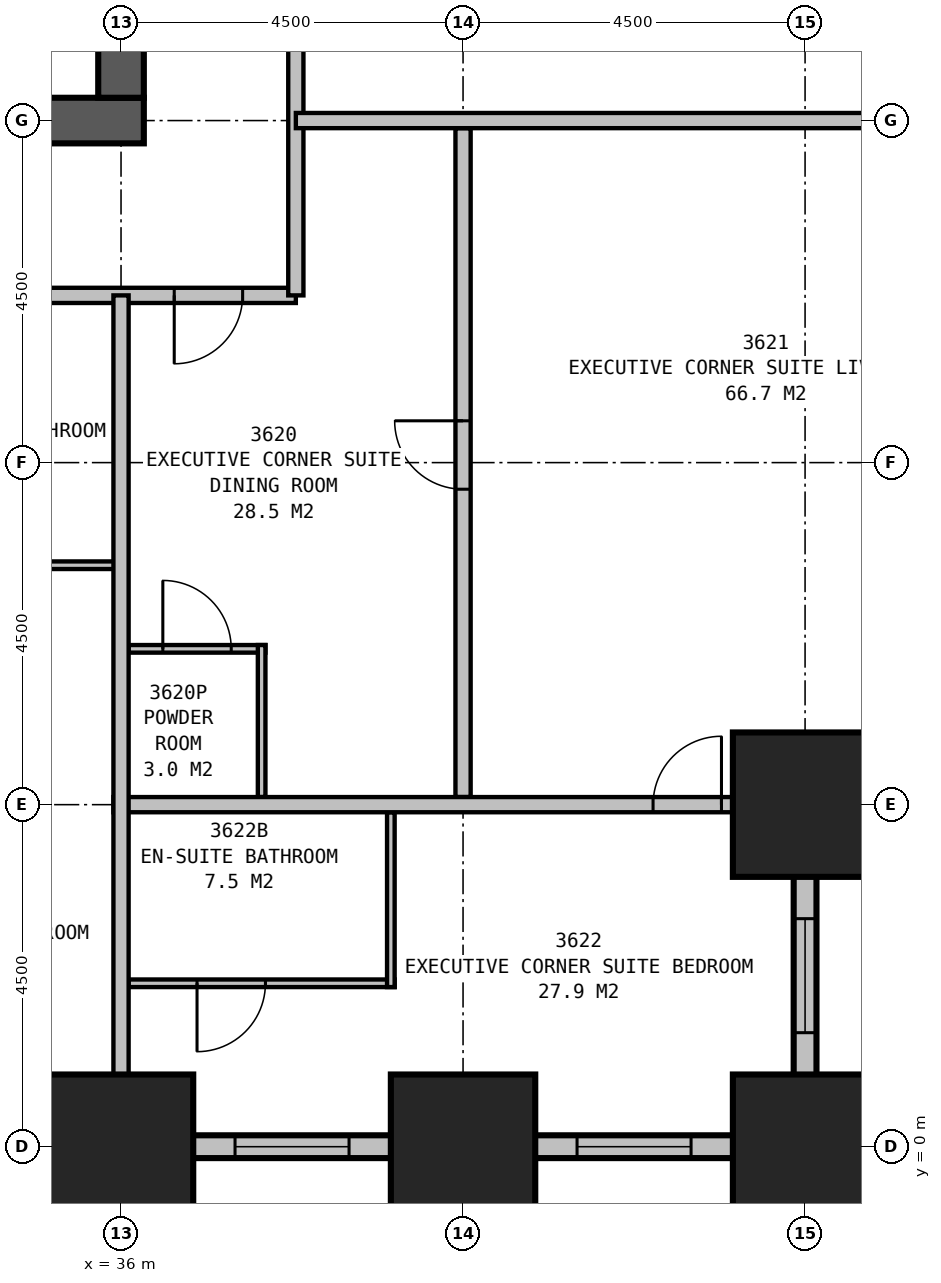
"""IFC4 building model, lengths in metres.
Left out: names, types, materials, properties, quantities, classifications, styles, units other than length and angle.
Written with IfcOpenShell. Run it as: python <this file> out.ifc"""

import sys

from ifc_helpers import new_model, si_unit, direction, frame, frame_2d, origin, origin_2d, place, context, subcontext, project, spatial, rectangle, extrude, element, fill, save


model = new_model("IFC4")
c1 = context("Model", 3, precision=1e-05, world=origin(), true_north=direction((0.0, 1.0)))
c2 = subcontext(c1, "Body", "Model", "MODEL_VIEW")
j1 = project(units=[si_unit("LENGTHUNIT", "METRE"), si_unit("PLANEANGLEUNIT", "RADIAN")], contexts=[c1])
p1 = place(None, origin())
s1 = spatial("IfcSite", under=j1, at=p1, CompositionType="ELEMENT")
p2 = place(p1, origin())
s2 = spatial("IfcBuilding", under=s1, at=p2, CompositionType="ELEMENT")
p3 = place(p2, frame((0.0, 0.0, 138.9)))
s3 = spatial("IfcBuildingStorey", under=s2, at=p3, CompositionType="ELEMENT", Elevation=138.9)
for number, where, z_axis, x_axis in (
    (1, (36.0, 0.0, 0.0), (0.0, 0.0, 1.0), (1.0, 0.0, 0.0)),
    (2, (40.5, 0.0, 0.0), (0.0, 0.0, 1.0), (1.0, 0.0, 0.0)),
    (3, (45.0, 0.0, 0.0), (0.0, 0.0, 1.0), (1.0, 0.0, 0.0)),
    (4, (45.0, 4.5, 0.0), (0.0, 0.0, 1.0), (1.0, 0.0, 0.0)),
):
    element("IfcColumn", number, at=place(p3, frame(where, z_axis=z_axis, x_axis=x_axis)), inside=s3, PredefinedType="COLUMN", context=c2, shape_type="SweptSolid", body=[
        extrude(rectangle(XDim=1.9, YDim=1.9, at=origin_2d()), origin(), (0.0, 0.0, 1.0), 3.5),
    ])
p4 = place(p3, frame((13.2, 13.5, 0.0), z_axis=(0.0, 0.0, 1.0), x_axis=(1.0, 0.0, 0.0)))
e5 = element("IfcWall", 5, at=p4, inside=s3, PredefinedType="SHEAR", context=c2, shape_type="SweptSolid", body=[
    extrude(rectangle(XDim=23.1, YDim=0.6, at=frame_2d((11.55, 0.0))), origin(), (0.0, 0.0, 1.0), 3.5),
])
p5 = place(p3, frame((36.0, 13.8, 0.0), z_axis=(0.0, 0.0, 1.0), x_axis=(0.0, 1.0, 0.0)))
e6 = element("IfcWall", 6, at=p5, inside=s3, PredefinedType="SHEAR", context=c2, shape_type="SweptSolid", body=[
    extrude(rectangle(XDim=2.7, YDim=0.6, at=frame_2d((1.35, 0.0))), origin(), (0.0, 0.0, 1.0), 3.5),
])
p6 = place(p3, frame((4.35, 0.0, 0.0), z_axis=(0.0, 0.0, 1.0), x_axis=(1.0, 0.0, 0.0)))
e7 = element("IfcWall", 7, at=p6, inside=s3, PredefinedType="STANDARD", context=c2, shape_type="SweptSolid", body=[
    extrude(rectangle(XDim=40.8, YDim=0.3, at=frame_2d((20.4, 0.0))), origin(), (0.0, 0.0, 1.0), 2.15),
])
p7 = place(p6, frame((1.65, 0.0, 0.5)))
e8 = element("IfcOpeningElement", 8, at=p7, cuts=e7, PredefinedType="OPENING", context=c2, shape_type="SweptSolid", body=[
    extrude(rectangle(XDim=1.5, YDim=1.5, at=frame_2d((0.75, 0.75))), frame((0.0, 0.16, 0.0), z_axis=(0.0, -1.0, 0.0), x_axis=(1.0, 0.0, 0.0)), (0.0, 0.0, 1.0), 0.32),
])
p8 = place(p6, frame((6.15, 0.0, 0.5)))
e9 = element("IfcOpeningElement", 9, at=p8, cuts=e7, PredefinedType="OPENING", context=c2, shape_type="SweptSolid", body=[
    extrude(rectangle(XDim=1.5, YDim=1.5, at=frame_2d((0.75, 0.75))), frame((0.0, 0.16, 0.0), z_axis=(0.0, -1.0, 0.0), x_axis=(1.0, 0.0, 0.0)), (0.0, 0.0, 1.0), 0.32),
])
p9 = place(p6, frame((10.65, 0.0, 0.5)))
e10 = element("IfcOpeningElement", 10, at=p9, cuts=e7, PredefinedType="OPENING", context=c2, shape_type="SweptSolid", body=[
    extrude(rectangle(XDim=1.5, YDim=1.5, at=frame_2d((0.75, 0.75))), frame((0.0, 0.16, 0.0), z_axis=(0.0, -1.0, 0.0), x_axis=(1.0, 0.0, 0.0)), (0.0, 0.0, 1.0), 0.32),
])
p10 = place(p6, frame((15.15, 0.0, 0.5)))
e11 = element("IfcOpeningElement", 11, at=p10, cuts=e7, PredefinedType="OPENING", context=c2, shape_type="SweptSolid", body=[
    extrude(rectangle(XDim=1.5, YDim=1.5, at=frame_2d((0.75, 0.75))), frame((0.0, 0.16, 0.0), z_axis=(0.0, -1.0, 0.0), x_axis=(1.0, 0.0, 0.0)), (0.0, 0.0, 1.0), 0.32),
])
p11 = place(p6, frame((19.65, 0.0, 0.5)))
e12 = element("IfcOpeningElement", 12, at=p11, cuts=e7, PredefinedType="OPENING", context=c2, shape_type="SweptSolid", body=[
    extrude(rectangle(XDim=1.5, YDim=1.5, at=frame_2d((0.75, 0.75))), frame((0.0, 0.16, 0.0), z_axis=(0.0, -1.0, 0.0), x_axis=(1.0, 0.0, 0.0)), (0.0, 0.0, 1.0), 0.32),
])
p12 = place(p6, frame((24.15, 0.0, 0.5)))
e13 = element("IfcOpeningElement", 13, at=p12, cuts=e7, PredefinedType="OPENING", context=c2, shape_type="SweptSolid", body=[
    extrude(rectangle(XDim=1.5, YDim=1.5, at=frame_2d((0.75, 0.75))), frame((0.0, 0.16, 0.0), z_axis=(0.0, -1.0, 0.0), x_axis=(1.0, 0.0, 0.0)), (0.0, 0.0, 1.0), 0.32),
])
p13 = place(p6, frame((28.65, 0.0, 0.5)))
e14 = element("IfcOpeningElement", 14, at=p13, cuts=e7, PredefinedType="OPENING", context=c2, shape_type="SweptSolid", body=[
    extrude(rectangle(XDim=1.5, YDim=1.5, at=frame_2d((0.75, 0.75))), frame((0.0, 0.16, 0.0), z_axis=(0.0, -1.0, 0.0), x_axis=(1.0, 0.0, 0.0)), (0.0, 0.0, 1.0), 0.32),
])
p14 = place(p6, frame((33.15, 0.0, 0.5)))
e15 = element("IfcOpeningElement", 15, at=p14, cuts=e7, PredefinedType="OPENING", context=c2, shape_type="SweptSolid", body=[
    extrude(rectangle(XDim=1.5, YDim=1.5, at=frame_2d((0.75, 0.75))), frame((0.0, 0.16, 0.0), z_axis=(0.0, -1.0, 0.0), x_axis=(1.0, 0.0, 0.0)), (0.0, 0.0, 1.0), 0.32),
])
p15 = place(p6, frame((37.65, 0.0, 0.5)))
e16 = element("IfcOpeningElement", 16, at=p15, cuts=e7, PredefinedType="OPENING", context=c2, shape_type="SweptSolid", body=[
    extrude(rectangle(XDim=1.5, YDim=1.5, at=frame_2d((0.75, 0.75))), frame((0.0, 0.16, 0.0), z_axis=(0.0, -1.0, 0.0), x_axis=(1.0, 0.0, 0.0)), (0.0, 0.0, 1.0), 0.32),
])
p16 = place(p3, frame((45.0, -0.15, 0.0), z_axis=(0.0, 0.0, 1.0), x_axis=(0.0, 1.0, 0.0)))
e17 = element("IfcWall", 17, at=p16, inside=s3, PredefinedType="STANDARD", context=c2, shape_type="SweptSolid", body=[
    extrude(rectangle(XDim=4.8, YDim=0.3, at=frame_2d((2.4, 0.0))), origin(), (0.0, 0.0, 1.0), 2.15),
])
p17 = place(p16, frame((1.65, 0.0, 0.5)))
e18 = element("IfcOpeningElement", 18, at=p17, cuts=e17, PredefinedType="OPENING", context=c2, shape_type="SweptSolid", body=[
    extrude(rectangle(XDim=1.5, YDim=1.5, at=frame_2d((0.75, 0.75))), frame((0.0, 0.16, 0.0), z_axis=(0.0, -1.0, 0.0), x_axis=(1.0, 0.0, 0.0)), (0.0, 0.0, 1.0), 0.32),
])
p18 = place(p3, frame((44.85, 4.5, 0.0), z_axis=(0.0, 0.0, 1.0), x_axis=(1.0, 0.0, 0.0)))
e19 = element("IfcWall", 19, at=p18, inside=s3, PredefinedType="STANDARD", context=c2, shape_type="SweptSolid", body=[
    extrude(rectangle(XDim=4.3, YDim=0.3, at=frame_2d((2.15, 0.0))), origin(), (0.0, 0.0, 1.0), 2.15),
])
p19 = place(p18, frame((1.4, 0.0, 0.5)))
e20 = element("IfcOpeningElement", 20, at=p19, cuts=e19, PredefinedType="OPENING", context=c2, shape_type="SweptSolid", body=[
    extrude(rectangle(XDim=1.5, YDim=1.5, at=frame_2d((0.75, 0.75))), frame((0.0, 0.16, 0.0), z_axis=(0.0, -1.0, 0.0), x_axis=(1.0, 0.0, 0.0)), (0.0, 0.0, 1.0), 0.32),
])
p20 = place(p3, frame((49.017, 4.351, 0.0), z_axis=(0.0, 0.0, 1.0), x_axis=(-0.110433201132, 0.993883548555, 0.0)))
e21 = element("IfcWall", 21, at=p20, inside=s3, PredefinedType="STANDARD", context=c2, shape_type="SweptSolid", body=[
    extrude(rectangle(XDim=31.994, YDim=0.3, at=frame_2d((15.997, 0.0))), origin(), (0.0, 0.0, 1.0), 2.15),
])
p21 = place(p20, frame((1.664, 0.0, 0.5)))
e22 = element("IfcOpeningElement", 22, at=p21, cuts=e21, PredefinedType="OPENING", context=c2, shape_type="SweptSolid", body=[
    extrude(rectangle(XDim=1.5, YDim=1.5, at=frame_2d((0.75, 0.75))), frame((0.0, 0.16, 0.0), z_axis=(0.0, -1.0, 0.0), x_axis=(1.0, 0.0, 0.0)), (0.0, 0.0, 1.0), 0.32),
])
p22 = place(p20, frame((6.192, 0.0, 0.5)))
e23 = element("IfcOpeningElement", 23, at=p22, cuts=e21, PredefinedType="OPENING", context=c2, shape_type="SweptSolid", body=[
    extrude(rectangle(XDim=1.5, YDim=1.5, at=frame_2d((0.75, 0.75))), frame((0.0, 0.16, 0.0), z_axis=(0.0, -1.0, 0.0), x_axis=(1.0, 0.0, 0.0)), (0.0, 0.0, 1.0), 0.32),
])
p23 = place(p20, frame((10.719, 0.0, 0.5)))
e24 = element("IfcOpeningElement", 24, at=p23, cuts=e21, PredefinedType="OPENING", context=c2, shape_type="SweptSolid", body=[
    extrude(rectangle(XDim=1.5, YDim=1.5, at=frame_2d((0.75, 0.75))), frame((0.0, 0.16, 0.0), z_axis=(0.0, -1.0, 0.0), x_axis=(1.0, 0.0, 0.0)), (0.0, 0.0, 1.0), 0.32),
])
p24 = place(p20, frame((15.247, 0.0, 0.5)))
e25 = element("IfcOpeningElement", 25, at=p24, cuts=e21, PredefinedType="OPENING", context=c2, shape_type="SweptSolid", body=[
    extrude(rectangle(XDim=1.5, YDim=1.5, at=frame_2d((0.75, 0.75))), frame((0.0, 0.16, 0.0), z_axis=(0.0, -1.0, 0.0), x_axis=(1.0, 0.0, 0.0)), (0.0, 0.0, 1.0), 0.32),
])
p25 = place(p20, frame((19.775, 0.0, 0.5)))
e26 = element("IfcOpeningElement", 26, at=p25, cuts=e21, PredefinedType="OPENING", context=c2, shape_type="SweptSolid", body=[
    extrude(rectangle(XDim=1.5, YDim=1.5, at=frame_2d((0.75, 0.75))), frame((0.0, 0.16, 0.0), z_axis=(0.0, -1.0, 0.0), x_axis=(1.0, 0.0, 0.0)), (0.0, 0.0, 1.0), 0.32),
])
p26 = place(p20, frame((24.302, 0.0, 0.5)))
e27 = element("IfcOpeningElement", 27, at=p26, cuts=e21, PredefinedType="OPENING", context=c2, shape_type="SweptSolid", body=[
    extrude(rectangle(XDim=1.5, YDim=1.5, at=frame_2d((0.75, 0.75))), frame((0.0, 0.16, 0.0), z_axis=(0.0, -1.0, 0.0), x_axis=(1.0, 0.0, 0.0)), (0.0, 0.0, 1.0), 0.32),
])
p27 = place(p20, frame((28.83, 0.0, 0.5)))
e28 = element("IfcOpeningElement", 28, at=p27, cuts=e21, PredefinedType="OPENING", context=c2, shape_type="SweptSolid", body=[
    extrude(rectangle(XDim=1.5, YDim=1.5, at=frame_2d((0.75, 0.75))), frame((0.0, 0.16, 0.0), z_axis=(0.0, -1.0, 0.0), x_axis=(1.0, 0.0, 0.0)), (0.0, 0.0, 1.0), 0.32),
])
p28 = place(p3, frame((11.2, 11.2, 0.0), z_axis=(0.0, 0.0, 1.0), x_axis=(1.0, 0.0, 0.0)))
e29 = element("IfcWall", 29, at=p28, inside=s3, PredefinedType="PARTITIONING", context=c2, shape_type="SweptSolid", body=[
    extrude(rectangle(XDim=27.1, YDim=0.2, at=frame_2d((13.55, 0.0))), origin(), (0.0, 0.0, 1.0), 3.25),
])
p29 = place(p28, frame((4.05, 0.0, 0.0), z_axis=(0.0, 0.0, 1.0), x_axis=(-1.0, 0.0, 0.0)))
e30 = element("IfcOpeningElement", 30, at=p29, cuts=e29, PredefinedType="OPENING", context=c2, shape_type="SweptSolid", body=[
    extrude(rectangle(XDim=0.9, YDim=2.1, at=frame_2d((0.45, 1.05))), frame((0.0, 0.11, 0.0), z_axis=(0.0, -1.0, 0.0), x_axis=(1.0, 0.0, 0.0)), (0.0, 0.0, 1.0), 0.22),
])
p30 = place(p28, frame((12.65, 0.0, 0.0), z_axis=(0.0, 0.0, 1.0), x_axis=(-1.0, 0.0, 0.0)))
e31 = element("IfcOpeningElement", 31, at=p30, cuts=e29, PredefinedType="OPENING", context=c2, shape_type="SweptSolid", body=[
    extrude(rectangle(XDim=1.0, YDim=2.1, at=frame_2d((0.5, 1.05))), frame((0.0, 0.11, 0.0), z_axis=(0.0, -1.0, 0.0), x_axis=(1.0, 0.0, 0.0)), (0.0, 0.0, 1.0), 0.22),
])
p31 = place(p28, frame((19.45, 0.0, 0.0), z_axis=(0.0, 0.0, 1.0), x_axis=(-1.0, 0.0, 0.0)))
e32 = element("IfcOpeningElement", 32, at=p31, cuts=e29, PredefinedType="OPENING", context=c2, shape_type="SweptSolid", body=[
    extrude(rectangle(XDim=0.9, YDim=2.1, at=frame_2d((0.45, 1.05))), frame((0.0, 0.11, 0.0), z_axis=(0.0, -1.0, 0.0), x_axis=(1.0, 0.0, 0.0)), (0.0, 0.0, 1.0), 0.22),
])
p32 = place(p28, frame((1.6, 0.0, 0.0), z_axis=(0.0, 0.0, 1.0), x_axis=(-1.0, 0.0, 0.0)))
e33 = element("IfcOpeningElement", 33, at=p32, cuts=e29, PredefinedType="OPENING", context=c2, shape_type="SweptSolid", body=[
    extrude(rectangle(XDim=0.9, YDim=2.1, at=frame_2d((0.45, 1.05))), frame((0.0, 0.11, 0.0), z_axis=(0.0, -1.0, 0.0), x_axis=(1.0, 0.0, 0.0)), (0.0, 0.0, 1.0), 0.22),
])
p33 = place(p28, frame((26.4, 0.0, 0.0), z_axis=(0.0, 0.0, 1.0), x_axis=(-1.0, 0.0, 0.0)))
e34 = element("IfcOpeningElement", 34, at=p33, cuts=e29, PredefinedType="OPENING", context=c2, shape_type="SweptSolid", body=[
    extrude(rectangle(XDim=0.9, YDim=2.1, at=frame_2d((0.45, 1.05))), frame((0.0, 0.11, 0.0), z_axis=(0.0, -1.0, 0.0), x_axis=(1.0, 0.0, 0.0)), (0.0, 0.0, 1.0), 0.22),
])
p34 = place(p3, frame((38.3, 11.2, 0.0), z_axis=(0.0, 0.0, 1.0), x_axis=(0.0, 1.0, 0.0)))
e35 = element("IfcWall", 35, at=p34, inside=s3, PredefinedType="PARTITIONING", context=c2, shape_type="SweptSolid", body=[
    extrude(rectangle(XDim=18.1, YDim=0.2, at=frame_2d((9.05, 0.0))), origin(), (0.0, 0.0, 1.0), 3.25),
])
p35 = place(p34, frame((5.0, 0.0, 0.0), z_axis=(0.0, 0.0, 1.0), x_axis=(-1.0, 0.0, 0.0)))
e36 = element("IfcOpeningElement", 36, at=p35, cuts=e35, PredefinedType="OPENING", context=c2, shape_type="SweptSolid", body=[
    extrude(rectangle(XDim=1.0, YDim=2.1, at=frame_2d((0.5, 1.05))), frame((0.0, 0.11, 0.0), z_axis=(0.0, -1.0, 0.0), x_axis=(1.0, 0.0, 0.0)), (0.0, 0.0, 1.0), 0.22),
])
p36 = place(p34, frame((8.55, 0.0, 0.0), z_axis=(0.0, 0.0, 1.0), x_axis=(-1.0, 0.0, 0.0)))
e37 = element("IfcOpeningElement", 37, at=p36, cuts=e35, PredefinedType="OPENING", context=c2, shape_type="SweptSolid", body=[
    extrude(rectangle(XDim=0.9, YDim=2.1, at=frame_2d((0.45, 1.05))), frame((0.0, 0.11, 0.0), z_axis=(0.0, -1.0, 0.0), x_axis=(1.0, 0.0, 0.0)), (0.0, 0.0, 1.0), 0.22),
])
p37 = place(p3, frame((33.0, 7.65, 0.0), z_axis=(0.0, 0.0, 1.0), x_axis=(1.0, 0.0, 0.0)))
e38 = element("IfcWall", 38, at=p37, inside=s3, PredefinedType="PLUMBINGWALL", context=c2, shape_type="SweptSolid", body=[
    extrude(rectangle(XDim=3.0, YDim=0.1, at=frame_2d((1.5, 0.0))), origin(), (0.0, 0.0, 1.0), 3.25),
])
p38 = place(p3, frame((38.3, 13.5, 0.0), z_axis=(0.0, 0.0, 1.0), x_axis=(1.0, 0.0, 0.0)))
e39 = element("IfcWall", 39, at=p38, inside=s3, PredefinedType="PARTITIONING", context=c2, shape_type="SweptSolid", body=[
    extrude(rectangle(XDim=9.921, YDim=0.2, at=frame_2d((4.96, 0.0))), origin(), (0.0, 0.0, 1.0), 1.95),
])
p39 = place(p3, frame((36.0, 11.2, 0.0), z_axis=(0.0, 0.0, 1.0), x_axis=(0.0, -1.0, 0.0)))
e40 = element("IfcWall", 40, at=p39, inside=s3, PredefinedType="PARTITIONING", context=c2, shape_type="SweptSolid", body=[
    extrude(rectangle(XDim=11.2, YDim=0.2, at=frame_2d((5.6, 0.0))), origin(), (0.0, 0.0, 1.0), 2.25),
])
p40 = place(p3, frame((35.9, 4.5, 0.0), z_axis=(0.0, 0.0, 1.0), x_axis=(1.0, 0.0, 0.0)))
e41 = element("IfcWall", 41, at=p40, inside=s3, PredefinedType="PARTITIONING", context=c2, shape_type="SweptSolid", body=[
    extrude(rectangle(XDim=9.1, YDim=0.2, at=frame_2d((4.55, 0.0))), origin(), (0.0, 0.0, 1.0), 3.25),
])
p41 = place(p40, frame((7.1, 0.0, 0.0)))
e42 = element("IfcOpeningElement", 42, at=p41, cuts=e41, PredefinedType="OPENING", context=c2, shape_type="SweptSolid", body=[
    extrude(rectangle(XDim=0.9, YDim=2.1, at=frame_2d((0.45, 1.05))), frame((0.0, 0.11, 0.0), z_axis=(0.0, -1.0, 0.0), x_axis=(1.0, 0.0, 0.0)), (0.0, 0.0, 1.0), 0.22),
])
p42 = place(p3, frame((40.5, 4.6, 0.0), z_axis=(0.0, 0.0, 1.0), x_axis=(0.0, 1.0, 0.0)))
e43 = element("IfcWall", 43, at=p42, inside=s3, PredefinedType="PARTITIONING", context=c2, shape_type="SweptSolid", body=[
    extrude(rectangle(XDim=8.8, YDim=0.2, at=frame_2d((4.4, 0.0))), origin(), (0.0, 0.0, 1.0), 2.25),
])
p43 = place(p42, frame((4.05, 0.0, 0.0)))
e44 = element("IfcOpeningElement", 44, at=p43, cuts=e43, PredefinedType="OPENING", context=c2, shape_type="SweptSolid", body=[
    extrude(rectangle(XDim=0.9, YDim=2.1, at=frame_2d((0.45, 1.05))), frame((0.0, 0.11, 0.0), z_axis=(0.0, -1.0, 0.0), x_axis=(1.0, 0.0, 0.0)), (0.0, 0.0, 1.0), 0.22),
])
p44 = place(p3, frame((37.85, 4.6, 0.0), z_axis=(0.0, 0.0, 1.0), x_axis=(0.0, 1.0, 0.0)))
e45 = element("IfcWall", 45, at=p44, inside=s3, PredefinedType="PLUMBINGWALL", context=c2, shape_type="SweptSolid", body=[
    extrude(rectangle(XDim=2.0, YDim=0.1, at=frame_2d((1.0, 0.0))), origin(), (0.0, 0.0, 1.0), 3.25),
])
p45 = place(p3, frame((36.1, 6.55, 0.0), z_axis=(0.0, 0.0, 1.0), x_axis=(1.0, 0.0, 0.0)))
e46 = element("IfcWall", 46, at=p45, inside=s3, PredefinedType="PLUMBINGWALL", context=c2, shape_type="SweptSolid", body=[
    extrude(rectangle(XDim=1.8, YDim=0.1, at=frame_2d((0.9, 0.0))), origin(), (0.0, 0.0, 1.0), 3.25),
])
p46 = place(p45, frame((0.45, 0.0, 0.0)))
e47 = element("IfcOpeningElement", 47, at=p46, cuts=e46, PredefinedType="OPENING", context=c2, shape_type="SweptSolid", body=[
    extrude(rectangle(XDim=0.9, YDim=2.1, at=frame_2d((0.45, 1.05))), frame((0.0, 0.06, 0.0), z_axis=(0.0, -1.0, 0.0), x_axis=(1.0, 0.0, 0.0)), (0.0, 0.0, 1.0), 0.12),
])
p47 = place(p3, frame((39.55, 4.4, 0.0), z_axis=(0.0, 0.0, 1.0), x_axis=(0.0, -1.0, 0.0)))
e48 = element("IfcWall", 48, at=p47, inside=s3, PredefinedType="PLUMBINGWALL", context=c2, shape_type="SweptSolid", body=[
    extrude(rectangle(XDim=2.3, YDim=0.1, at=frame_2d((1.15, 0.0))), origin(), (0.0, 0.0, 1.0), 3.25),
])
p48 = place(p3, frame((36.1, 2.15, 0.0), z_axis=(0.0, 0.0, 1.0), x_axis=(1.0, 0.0, 0.0)))
e49 = element("IfcWall", 49, at=p48, inside=s3, PredefinedType="PLUMBINGWALL", context=c2, shape_type="SweptSolid", body=[
    extrude(rectangle(XDim=3.5, YDim=0.1, at=frame_2d((1.75, 0.0))), origin(), (0.0, 0.0, 1.0), 3.25),
])
p49 = place(p48, frame((1.8, 0.0, 0.0), z_axis=(0.0, 0.0, 1.0), x_axis=(-1.0, 0.0, 0.0)))
e50 = element("IfcOpeningElement", 50, at=p49, cuts=e49, PredefinedType="OPENING", context=c2, shape_type="SweptSolid", body=[
    extrude(rectangle(XDim=0.9, YDim=2.1, at=frame_2d((0.45, 1.05))), frame((0.0, 0.06, 0.0), z_axis=(0.0, -1.0, 0.0), x_axis=(1.0, 0.0, 0.0)), (0.0, 0.0, 1.0), 0.12),
])
p50 = place(p14, origin())
e51 = element("IfcWindow", 51, at=p50, inside=s3, PartitioningType="SINGLE_PANEL", PredefinedType="WINDOW", context=c2, shape_type="SweptSolid", body=[
    extrude(rectangle(XDim=1.5, YDim=1.5, at=frame_2d((0.75, 0.75))), frame((0.0, 0.03, 0.0), z_axis=(0.0, -1.0, 0.0), x_axis=(1.0, 0.0, 0.0)), (0.0, 0.0, 1.0), 0.06),
])
fill(e15, e51)
p51 = place(p15, origin())
e52 = element("IfcWindow", 52, at=p51, inside=s3, PartitioningType="SINGLE_PANEL", PredefinedType="WINDOW", context=c2, shape_type="SweptSolid", body=[
    extrude(rectangle(XDim=1.5, YDim=1.5, at=frame_2d((0.75, 0.75))), frame((0.0, 0.03, 0.0), z_axis=(0.0, -1.0, 0.0), x_axis=(1.0, 0.0, 0.0)), (0.0, 0.0, 1.0), 0.06),
])
fill(e16, e52)
p52 = place(p17, origin())
e53 = element("IfcWindow", 53, at=p52, inside=s3, PartitioningType="SINGLE_PANEL", PredefinedType="WINDOW", context=c2, shape_type="SweptSolid", body=[
    extrude(rectangle(XDim=1.5, YDim=1.5, at=frame_2d((0.75, 0.75))), frame((0.0, 0.03, 0.0), z_axis=(0.0, -1.0, 0.0), x_axis=(1.0, 0.0, 0.0)), (0.0, 0.0, 1.0), 0.06),
])
fill(e18, e53)
p53 = place(p33, origin())
e54 = element("IfcDoor", 54, at=p53, inside=s3, OperationType="SINGLE_SWING_RIGHT", PredefinedType="DOOR", context=c2, shape_type="SweptSolid", body=[
    extrude(rectangle(XDim=0.9, YDim=2.1, at=frame_2d((0.45, 1.05))), frame((0.0, 0.025, 0.0), z_axis=(0.0, -1.0, 0.0), x_axis=(1.0, 0.0, 0.0)), (0.0, 0.0, 1.0), 0.05),
])
fill(e34, e54)
p54 = place(p41, origin())
e55 = element("IfcDoor", 55, at=p54, inside=s3, OperationType="SINGLE_SWING_RIGHT", PredefinedType="DOOR", context=c2, shape_type="SweptSolid", body=[
    extrude(rectangle(XDim=0.9, YDim=2.1, at=frame_2d((0.45, 1.05))), frame((0.0, 0.025, 0.0), z_axis=(0.0, -1.0, 0.0), x_axis=(1.0, 0.0, 0.0)), (0.0, 0.0, 1.0), 0.05),
])
fill(e42, e55)
p55 = place(p43, origin())
e56 = element("IfcDoor", 56, at=p55, inside=s3, OperationType="SINGLE_SWING_RIGHT", PredefinedType="DOOR", context=c2, shape_type="SweptSolid", body=[
    extrude(rectangle(XDim=0.9, YDim=2.1, at=frame_2d((0.45, 1.05))), frame((0.0, 0.025, 0.0), z_axis=(0.0, -1.0, 0.0), x_axis=(1.0, 0.0, 0.0)), (0.0, 0.0, 1.0), 0.05),
])
fill(e44, e56)
p56 = place(p46, origin())
e57 = element("IfcDoor", 57, at=p56, inside=s3, OperationType="SINGLE_SWING_LEFT", PredefinedType="DOOR", context=c2, shape_type="SweptSolid", body=[
    extrude(rectangle(XDim=0.9, YDim=2.1, at=frame_2d((0.45, 1.05))), frame((0.0, 0.025, 0.0), z_axis=(0.0, -1.0, 0.0), x_axis=(1.0, 0.0, 0.0)), (0.0, 0.0, 1.0), 0.05),
])
fill(e47, e57)
p57 = place(p49, origin())
e58 = element("IfcDoor", 58, at=p57, inside=s3, OperationType="SINGLE_SWING_RIGHT", PredefinedType="DOOR", context=c2, shape_type="SweptSolid", body=[
    extrude(rectangle(XDim=0.9, YDim=2.1, at=frame_2d((0.45, 1.05))), frame((0.0, 0.025, 0.0), z_axis=(0.0, -1.0, 0.0), x_axis=(1.0, 0.0, 0.0)), (0.0, 0.0, 1.0), 0.05),
])
fill(e50, e58)
save(model, sys.argv[1])
